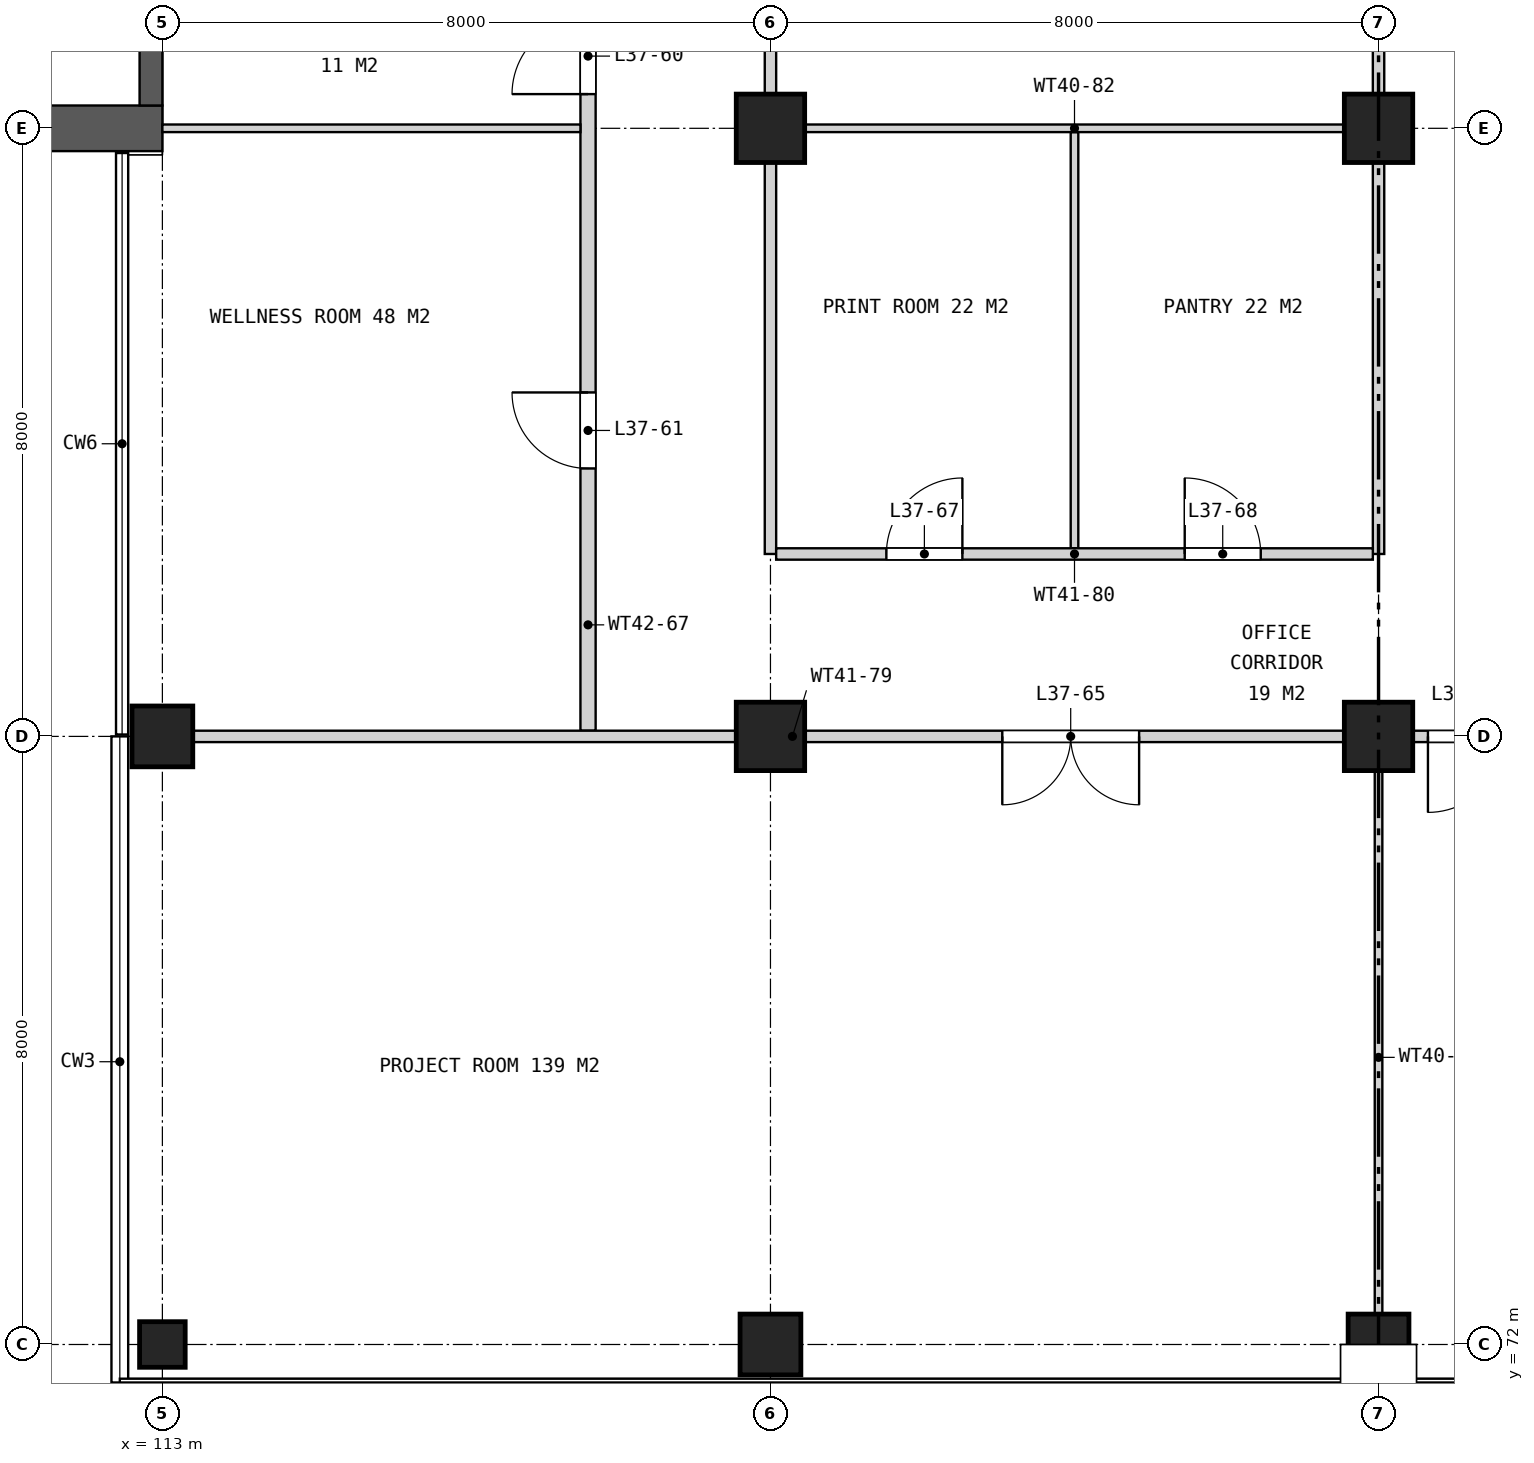
"""IFC4 building model, lengths in metres.
Left out: names, types, materials, properties, quantities, classifications, styles, units other than length and angle.
Written with IfcOpenShell. Run it as: python <this file> out.ifc"""

import sys

from ifc_helpers import new_model, si_unit, direction, frame, frame_2d, origin, origin_2d, place, context, subcontext, project, spatial, rectangle, extrude, element, fill, save


model = new_model("IFC4")
c1 = context("Model", 3, precision=1e-05, world=origin(), true_north=direction((0.0, 1.0)))
c2 = subcontext(c1, "Body", "Model", "MODEL_VIEW")
j1 = project(units=[si_unit("LENGTHUNIT", "METRE"), si_unit("PLANEANGLEUNIT", "RADIAN")], contexts=[c1])
p1 = place(None, origin())
s1 = spatial("IfcSite", under=j1, at=p1, CompositionType="ELEMENT")
p2 = place(p1, origin())
s2 = spatial("IfcBuilding", under=s1, at=p2, CompositionType="ELEMENT")
p3 = place(p2, frame((0.0, 0.0, 178.9)))
s3 = spatial("IfcBuildingStorey", under=s2, at=p3, CompositionType="ELEMENT", Elevation=178.9)
p4 = place(p3, frame((113.0, 72.0, 0.0), z_axis=(0.0, 0.0, 1.0), x_axis=(1.0, 0.0, 0.0)))
e1 = element("IfcColumn", 1, at=p4, inside=s3, PredefinedType="COLUMN", context=c2, shape_type="SweptSolid", body=[
    extrude(rectangle(XDim=0.6, YDim=0.6, at=origin_2d()), origin(), (0.0, 0.0, 1.0), 4.2),
])
for number, where, z_axis, x_axis in (
    (2, (113.0, 80.0, 0.0), (0.0, 0.0, 1.0), (1.0, 0.0, 0.0)),
    (3, (121.0, 72.0, 0.0), (0.0, 0.0, 1.0), (1.0, 0.0, 0.0)),
):
    element("IfcColumn", number, at=place(p3, frame(where, z_axis=z_axis, x_axis=x_axis)), inside=s3, PredefinedType="COLUMN", context=c2, shape_type="SweptSolid", body=[
        extrude(rectangle(XDim=0.8, YDim=0.8, at=origin_2d()), origin(), (0.0, 0.0, 1.0), 4.2),
    ])
for number, where, z_axis, x_axis in (
    (4, (121.0, 80.0, 0.0), (0.0, 0.0, 1.0), (1.0, 0.0, 0.0)),
    (5, (121.0, 88.0, 0.0), (0.0, 0.0, 1.0), (1.0, 0.0, 0.0)),
):
    element("IfcColumn", number, at=place(p3, frame(where, z_axis=z_axis, x_axis=x_axis)), inside=s3, PredefinedType="COLUMN", context=c2, shape_type="SweptSolid", body=[
        extrude(rectangle(XDim=0.9, YDim=0.9, at=origin_2d()), origin(), (0.0, 0.0, 1.0), 4.2),
    ])
p5 = place(p3, frame((129.0, 72.0, 0.0), z_axis=(0.0, 0.0, 1.0), x_axis=(1.0, 0.0, 0.0)))
e6 = element("IfcColumn", 6, at=p5, inside=s3, PredefinedType="COLUMN", context=c2, shape_type="SweptSolid", body=[
    extrude(rectangle(XDim=0.8, YDim=0.8, at=origin_2d()), origin(), (0.0, 0.0, 1.0), 4.2),
])
for number, where, z_axis, x_axis in (
    (7, (129.0, 80.0, 0.0), (0.0, 0.0, 1.0), (1.0, 0.0, 0.0)),
    (8, (129.0, 88.0, 0.0), (0.0, 0.0, 1.0), (1.0, 0.0, 0.0)),
):
    element("IfcColumn", number, at=place(p3, frame(where, z_axis=z_axis, x_axis=x_axis)), inside=s3, PredefinedType="COLUMN", context=c2, shape_type="SweptSolid", body=[
        extrude(rectangle(XDim=0.9, YDim=0.9, at=origin_2d()), origin(), (0.0, 0.0, 1.0), 4.2),
    ])
p6 = place(p3, frame((113.0, 88.0, 0.0), z_axis=(0.0, 0.0, 1.0), x_axis=(-1.0, 0.0, 0.0)))
e9 = element("IfcWall", 9, at=p6, inside=s3, PredefinedType="SHEAR", context=c2, shape_type="SweptSolid", body=[
    extrude(rectangle(XDim=7.1, YDim=0.6, at=frame_2d((3.55, 0.0))), origin(), (0.0, 0.0, 1.0), 4.2),
])
p7 = place(p3, frame((112.85, 94.3, 0.0), z_axis=(0.0, 0.0, 1.0), x_axis=(0.0, -1.0, 0.0)))
e10 = element("IfcWall", 10, at=p7, inside=s3, PredefinedType="SHEAR", context=c2, shape_type="SweptSolid", body=[
    extrude(rectangle(XDim=6.0, YDim=0.3, at=frame_2d((3.0, 0.0))), origin(), (0.0, 0.0, 1.0), 4.2),
])
p8 = place(p3, frame((118.6, 80.075, 0.0), z_axis=(0.0, 0.0, 1.0), x_axis=(0.0, 1.0, 0.0)))
e11 = element("IfcWall", 11, at=p8, inside=s3, PredefinedType="SOLIDWALL", context=c2, shape_type="SweptSolid", body=[
    extrude(rectangle(XDim=13.925, YDim=0.2, at=frame_2d((6.962, 0.0))), origin(), (0.0, 0.0, 1.0), 3.44),
])
p9 = place(p8, frame((12.375, 0.0, 0.0)))
e12 = element("IfcOpeningElement", 12, at=p9, cuts=e11, PredefinedType="OPENING", context=c2, shape_type="SweptSolid", body=[
    extrude(rectangle(XDim=1.0, YDim=2.1, at=frame_2d((0.5, 1.05))), frame((0.0, 0.11, 0.0), z_axis=(0.0, -1.0, 0.0), x_axis=(1.0, 0.0, 0.0)), (0.0, 0.0, 1.0), 0.22),
])
p10 = place(p8, frame((10.375, 0.0, 0.0)))
e13 = element("IfcOpeningElement", 13, at=p10, cuts=e11, PredefinedType="OPENING", context=c2, shape_type="SweptSolid", body=[
    extrude(rectangle(XDim=1.0, YDim=2.1, at=frame_2d((0.5, 1.05))), frame((0.0, 0.11, 0.0), z_axis=(0.0, -1.0, 0.0), x_axis=(1.0, 0.0, 0.0)), (0.0, 0.0, 1.0), 0.22),
])
p11 = place(p8, frame((8.375, 0.0, 0.0)))
e14 = element("IfcOpeningElement", 14, at=p11, cuts=e11, PredefinedType="OPENING", context=c2, shape_type="SweptSolid", body=[
    extrude(rectangle(XDim=1.0, YDim=2.1, at=frame_2d((0.5, 1.05))), frame((0.0, 0.11, 0.0), z_axis=(0.0, -1.0, 0.0), x_axis=(1.0, 0.0, 0.0)), (0.0, 0.0, 1.0), 0.22),
])
p12 = place(p8, frame((3.45, 0.0, 0.0)))
e15 = element("IfcOpeningElement", 15, at=p12, cuts=e11, PredefinedType="OPENING", context=c2, shape_type="SweptSolid", body=[
    extrude(rectangle(XDim=1.0, YDim=2.1, at=frame_2d((0.5, 1.05))), frame((0.0, 0.11, 0.0), z_axis=(0.0, -1.0, 0.0), x_axis=(1.0, 0.0, 0.0)), (0.0, 0.0, 1.0), 0.22),
])
p13 = place(p3, frame((121.0, 82.4, 0.0), z_axis=(0.0, 0.0, 1.0), x_axis=(0.0, 1.0, 0.0)))
e16 = element("IfcWall", 16, at=p13, inside=s3, PredefinedType="PARTITIONING", context=c2, shape_type="SweptSolid", body=[
    extrude(rectangle(XDim=35.2, YDim=0.15, at=frame_2d((17.6, 0.0))), origin(), (0.0, 0.0, 1.0), 3.44),
])
p14 = place(p13, frame((8.25, 0.0, 0.0)))
e17 = element("IfcOpeningElement", 17, at=p14, cuts=e16, PredefinedType="OPENING", context=c2, shape_type="SweptSolid", body=[
    extrude(rectangle(XDim=1.0, YDim=2.1, at=frame_2d((0.5, 1.05))), frame((0.0, 0.085, 0.0), z_axis=(0.0, -1.0, 0.0), x_axis=(1.0, 0.0, 0.0)), (0.0, 0.0, 1.0), 0.17),
])
p15 = place(p13, frame((14.35, 0.0, 0.0)))
e18 = element("IfcOpeningElement", 18, at=p15, cuts=e16, PredefinedType="OPENING", context=c2, shape_type="SweptSolid", body=[
    extrude(rectangle(XDim=1.0, YDim=2.1, at=frame_2d((0.5, 1.05))), frame((0.0, 0.085, 0.0), z_axis=(0.0, -1.0, 0.0), x_axis=(1.0, 0.0, 0.0)), (0.0, 0.0, 1.0), 0.17),
])
p16 = place(p13, frame((18.75, 0.0, 0.0)))
e19 = element("IfcOpeningElement", 19, at=p16, cuts=e16, PredefinedType="OPENING", context=c2, shape_type="SweptSolid", body=[
    extrude(rectangle(XDim=1.0, YDim=2.1, at=frame_2d((0.5, 1.05))), frame((0.0, 0.085, 0.0), z_axis=(0.0, -1.0, 0.0), x_axis=(1.0, 0.0, 0.0)), (0.0, 0.0, 1.0), 0.17),
])
p17 = place(p13, frame((23.45, 0.0, 0.0)))
e20 = element("IfcOpeningElement", 20, at=p17, cuts=e16, PredefinedType="OPENING", context=c2, shape_type="SweptSolid", body=[
    extrude(rectangle(XDim=1.0, YDim=2.1, at=frame_2d((0.5, 1.05))), frame((0.0, 0.085, 0.0), z_axis=(0.0, -1.0, 0.0), x_axis=(1.0, 0.0, 0.0)), (0.0, 0.0, 1.0), 0.17),
])
p18 = place(p3, frame((125.0, 82.475, 0.0), z_axis=(0.0, 0.0, 1.0), x_axis=(0.0, 1.0, 0.0)))
e21 = element("IfcWall", 21, at=p18, inside=s3, PredefinedType="PARTITIONING", context=c2, shape_type="SweptSolid", body=[
    extrude(rectangle(XDim=5.475, YDim=0.1, at=frame_2d((2.737, 0.0))), origin(), (0.0, 0.0, 1.0), 3.44),
])
p19 = place(p3, frame((129.0, 71.63, 0.0), z_axis=(0.0, 0.0, 1.0), x_axis=(0.0, 1.0, 0.0)))
e22 = element("IfcWall", 22, at=p19, inside=s3, PredefinedType="PARTITIONING", context=c2, shape_type="SweptSolid", body=[
    extrude(rectangle(XDim=8.295, YDim=0.1, at=frame_2d((4.147, 0.0))), origin(), (0.0, 0.0, 1.0), 3.44),
])
p20 = place(p3, frame((129.0, 82.4, 0.0), z_axis=(0.0, 0.0, 1.0), x_axis=(0.0, 1.0, 0.0)))
e23 = element("IfcWall", 23, at=p20, inside=s3, PredefinedType="PARTITIONING", context=c2, shape_type="SweptSolid", body=[
    extrude(rectangle(XDim=35.2, YDim=0.15, at=frame_2d((17.6, 0.0))), origin(), (0.0, 0.0, 1.0), 3.44),
])
p21 = place(p20, frame((14.35, 0.0, 0.0)))
e24 = element("IfcOpeningElement", 24, at=p21, cuts=e23, PredefinedType="OPENING", context=c2, shape_type="SweptSolid", body=[
    extrude(rectangle(XDim=1.0, YDim=2.1, at=frame_2d((0.5, 1.05))), frame((0.0, 0.085, 0.0), z_axis=(0.0, -1.0, 0.0), x_axis=(1.0, 0.0, 0.0)), (0.0, 0.0, 1.0), 0.17),
])
p22 = place(p20, frame((23.45, 0.0, 0.0)))
e25 = element("IfcOpeningElement", 25, at=p22, cuts=e23, PredefinedType="OPENING", context=c2, shape_type="SweptSolid", body=[
    extrude(rectangle(XDim=1.0, YDim=2.1, at=frame_2d((0.5, 1.05))), frame((0.0, 0.085, 0.0), z_axis=(0.0, -1.0, 0.0), x_axis=(1.0, 0.0, 0.0)), (0.0, 0.0, 1.0), 0.17),
])
p23 = place(p3, frame((112.63, 80.0, 0.0), z_axis=(0.0, 0.0, 1.0), x_axis=(1.0, 0.0, 0.0)))
e26 = element("IfcWall", 26, at=p23, inside=s3, PredefinedType="PARTITIONING", context=c2, shape_type="SweptSolid", body=[
    extrude(rectangle(XDim=24.74, YDim=0.15, at=frame_2d((12.37, 0.0))), origin(), (0.0, 0.0, 1.0), 3.44),
])
p24 = place(p23, frame((11.42, 0.0, 0.0)))
e27 = element("IfcOpeningElement", 27, at=p24, cuts=e26, PredefinedType="OPENING", context=c2, shape_type="SweptSolid", body=[
    extrude(rectangle(XDim=1.8, YDim=2.1, at=frame_2d((0.9, 1.05))), frame((0.0, 0.085, 0.0), z_axis=(0.0, -1.0, 0.0), x_axis=(1.0, 0.0, 0.0)), (0.0, 0.0, 1.0), 0.17),
])
p25 = place(p23, frame((17.02, 0.0, 0.0)))
e28 = element("IfcOpeningElement", 28, at=p25, cuts=e26, PredefinedType="OPENING", context=c2, shape_type="SweptSolid", body=[
    extrude(rectangle(XDim=1.0, YDim=2.1, at=frame_2d((0.5, 1.05))), frame((0.0, 0.085, 0.0), z_axis=(0.0, -1.0, 0.0), x_axis=(1.0, 0.0, 0.0)), (0.0, 0.0, 1.0), 0.17),
])
p26 = place(p3, frame((121.075, 82.4, 0.0), z_axis=(0.0, 0.0, 1.0), x_axis=(1.0, 0.0, 0.0)))
e29 = element("IfcWall", 29, at=p26, inside=s3, PredefinedType="PARTITIONING", context=c2, shape_type="SweptSolid", body=[
    extrude(rectangle(XDim=7.85, YDim=0.15, at=frame_2d((3.925, 0.0))), origin(), (0.0, 0.0, 1.0), 3.44),
])
p27 = place(p26, frame((1.45, 0.0, 0.0)))
e30 = element("IfcOpeningElement", 30, at=p27, cuts=e29, PredefinedType="OPENING", context=c2, shape_type="SweptSolid", body=[
    extrude(rectangle(XDim=1.0, YDim=2.1, at=frame_2d((0.5, 1.05))), frame((0.0, 0.085, 0.0), z_axis=(0.0, -1.0, 0.0), x_axis=(1.0, 0.0, 0.0)), (0.0, 0.0, 1.0), 0.17),
])
p28 = place(p26, frame((5.375, 0.0, 0.0)))
e31 = element("IfcOpeningElement", 31, at=p28, cuts=e29, PredefinedType="OPENING", context=c2, shape_type="SweptSolid", body=[
    extrude(rectangle(XDim=1.0, YDim=2.1, at=frame_2d((0.5, 1.05))), frame((0.0, 0.085, 0.0), z_axis=(0.0, -1.0, 0.0), x_axis=(1.0, 0.0, 0.0)), (0.0, 0.0, 1.0), 0.17),
])
p29 = place(p3, frame((113.0, 88.0, 0.0), z_axis=(0.0, 0.0, 1.0), x_axis=(1.0, 0.0, 0.0)))
e32 = element("IfcWall", 32, at=p29, inside=s3, PredefinedType="PARTITIONING", context=c2, shape_type="SweptSolid", body=[
    extrude(rectangle(XDim=5.5, YDim=0.1, at=frame_2d((2.75, 0.0))), origin(), (0.0, 0.0, 1.0), 3.44),
])
p30 = place(p3, frame((121.075, 88.0, 0.0), z_axis=(0.0, 0.0, 1.0), x_axis=(1.0, 0.0, 0.0)))
e33 = element("IfcWall", 33, at=p30, inside=s3, PredefinedType="PARTITIONING", context=c2, shape_type="SweptSolid", body=[
    extrude(rectangle(XDim=7.85, YDim=0.1, at=frame_2d((3.925, 0.0))), origin(), (0.0, 0.0, 1.0), 3.44),
])
p31 = place(p11, origin())
e34 = element("IfcDoor", 34, at=p31, inside=s3, OperationType="SINGLE_SWING_LEFT", PredefinedType="DOOR", context=c2, shape_type="SweptSolid", body=[
    extrude(rectangle(XDim=1.0, YDim=2.1, at=frame_2d((0.5, 1.05))), frame((0.0, 0.025, 0.0), z_axis=(0.0, -1.0, 0.0), x_axis=(1.0, 0.0, 0.0)), (0.0, 0.0, 1.0), 0.05),
])
fill(e14, e34)
p32 = place(p12, origin())
e35 = element("IfcDoor", 35, at=p32, inside=s3, OperationType="SINGLE_SWING_RIGHT", PredefinedType="DOOR", context=c2, shape_type="SweptSolid", body=[
    extrude(rectangle(XDim=1.0, YDim=2.1, at=frame_2d((0.5, 1.05))), frame((0.0, 0.025, 0.0), z_axis=(0.0, -1.0, 0.0), x_axis=(1.0, 0.0, 0.0)), (0.0, 0.0, 1.0), 0.05),
])
fill(e15, e35)
p33 = place(p24, frame((1.8, 0.0, 0.0), z_axis=(0.0, 0.0, 1.0), x_axis=(-1.0, 0.0, 0.0)))
e36 = element("IfcDoor", 36, at=p33, inside=s3, OperationType="DOUBLE_DOOR_SINGLE_SWING", PredefinedType="DOOR", context=c2, shape_type="SweptSolid", body=[
    extrude(rectangle(XDim=1.8, YDim=2.1, at=frame_2d((0.9, 1.05))), frame((0.0, 0.025, 0.0), z_axis=(0.0, -1.0, 0.0), x_axis=(1.0, 0.0, 0.0)), (0.0, 0.0, 1.0), 0.05),
])
fill(e27, e36)
p34 = place(p25, frame((1.0, 0.0, 0.0), z_axis=(0.0, 0.0, 1.0), x_axis=(-1.0, 0.0, 0.0)))
e37 = element("IfcDoor", 37, at=p34, inside=s3, OperationType="SINGLE_SWING_RIGHT", PredefinedType="DOOR", context=c2, shape_type="SweptSolid", body=[
    extrude(rectangle(XDim=1.0, YDim=2.1, at=frame_2d((0.5, 1.05))), frame((0.0, 0.025, 0.0), z_axis=(0.0, -1.0, 0.0), x_axis=(1.0, 0.0, 0.0)), (0.0, 0.0, 1.0), 0.05),
])
fill(e28, e37)
p35 = place(p27, origin())
e38 = element("IfcDoor", 38, at=p35, inside=s3, OperationType="SINGLE_SWING_RIGHT", PredefinedType="DOOR", context=c2, shape_type="SweptSolid", body=[
    extrude(rectangle(XDim=1.0, YDim=2.1, at=frame_2d((0.5, 1.05))), frame((0.0, 0.025, 0.0), z_axis=(0.0, -1.0, 0.0), x_axis=(1.0, 0.0, 0.0)), (0.0, 0.0, 1.0), 0.05),
])
fill(e30, e38)
p36 = place(p28, origin())
e39 = element("IfcDoor", 39, at=p36, inside=s3, OperationType="SINGLE_SWING_LEFT", PredefinedType="DOOR", context=c2, shape_type="SweptSolid", body=[
    extrude(rectangle(XDim=1.0, YDim=2.1, at=frame_2d((0.5, 1.05))), frame((0.0, 0.025, 0.0), z_axis=(0.0, -1.0, 0.0), x_axis=(1.0, 0.0, 0.0)), (0.0, 0.0, 1.0), 0.05),
])
fill(e31, e39)
save(model, sys.argv[1])
